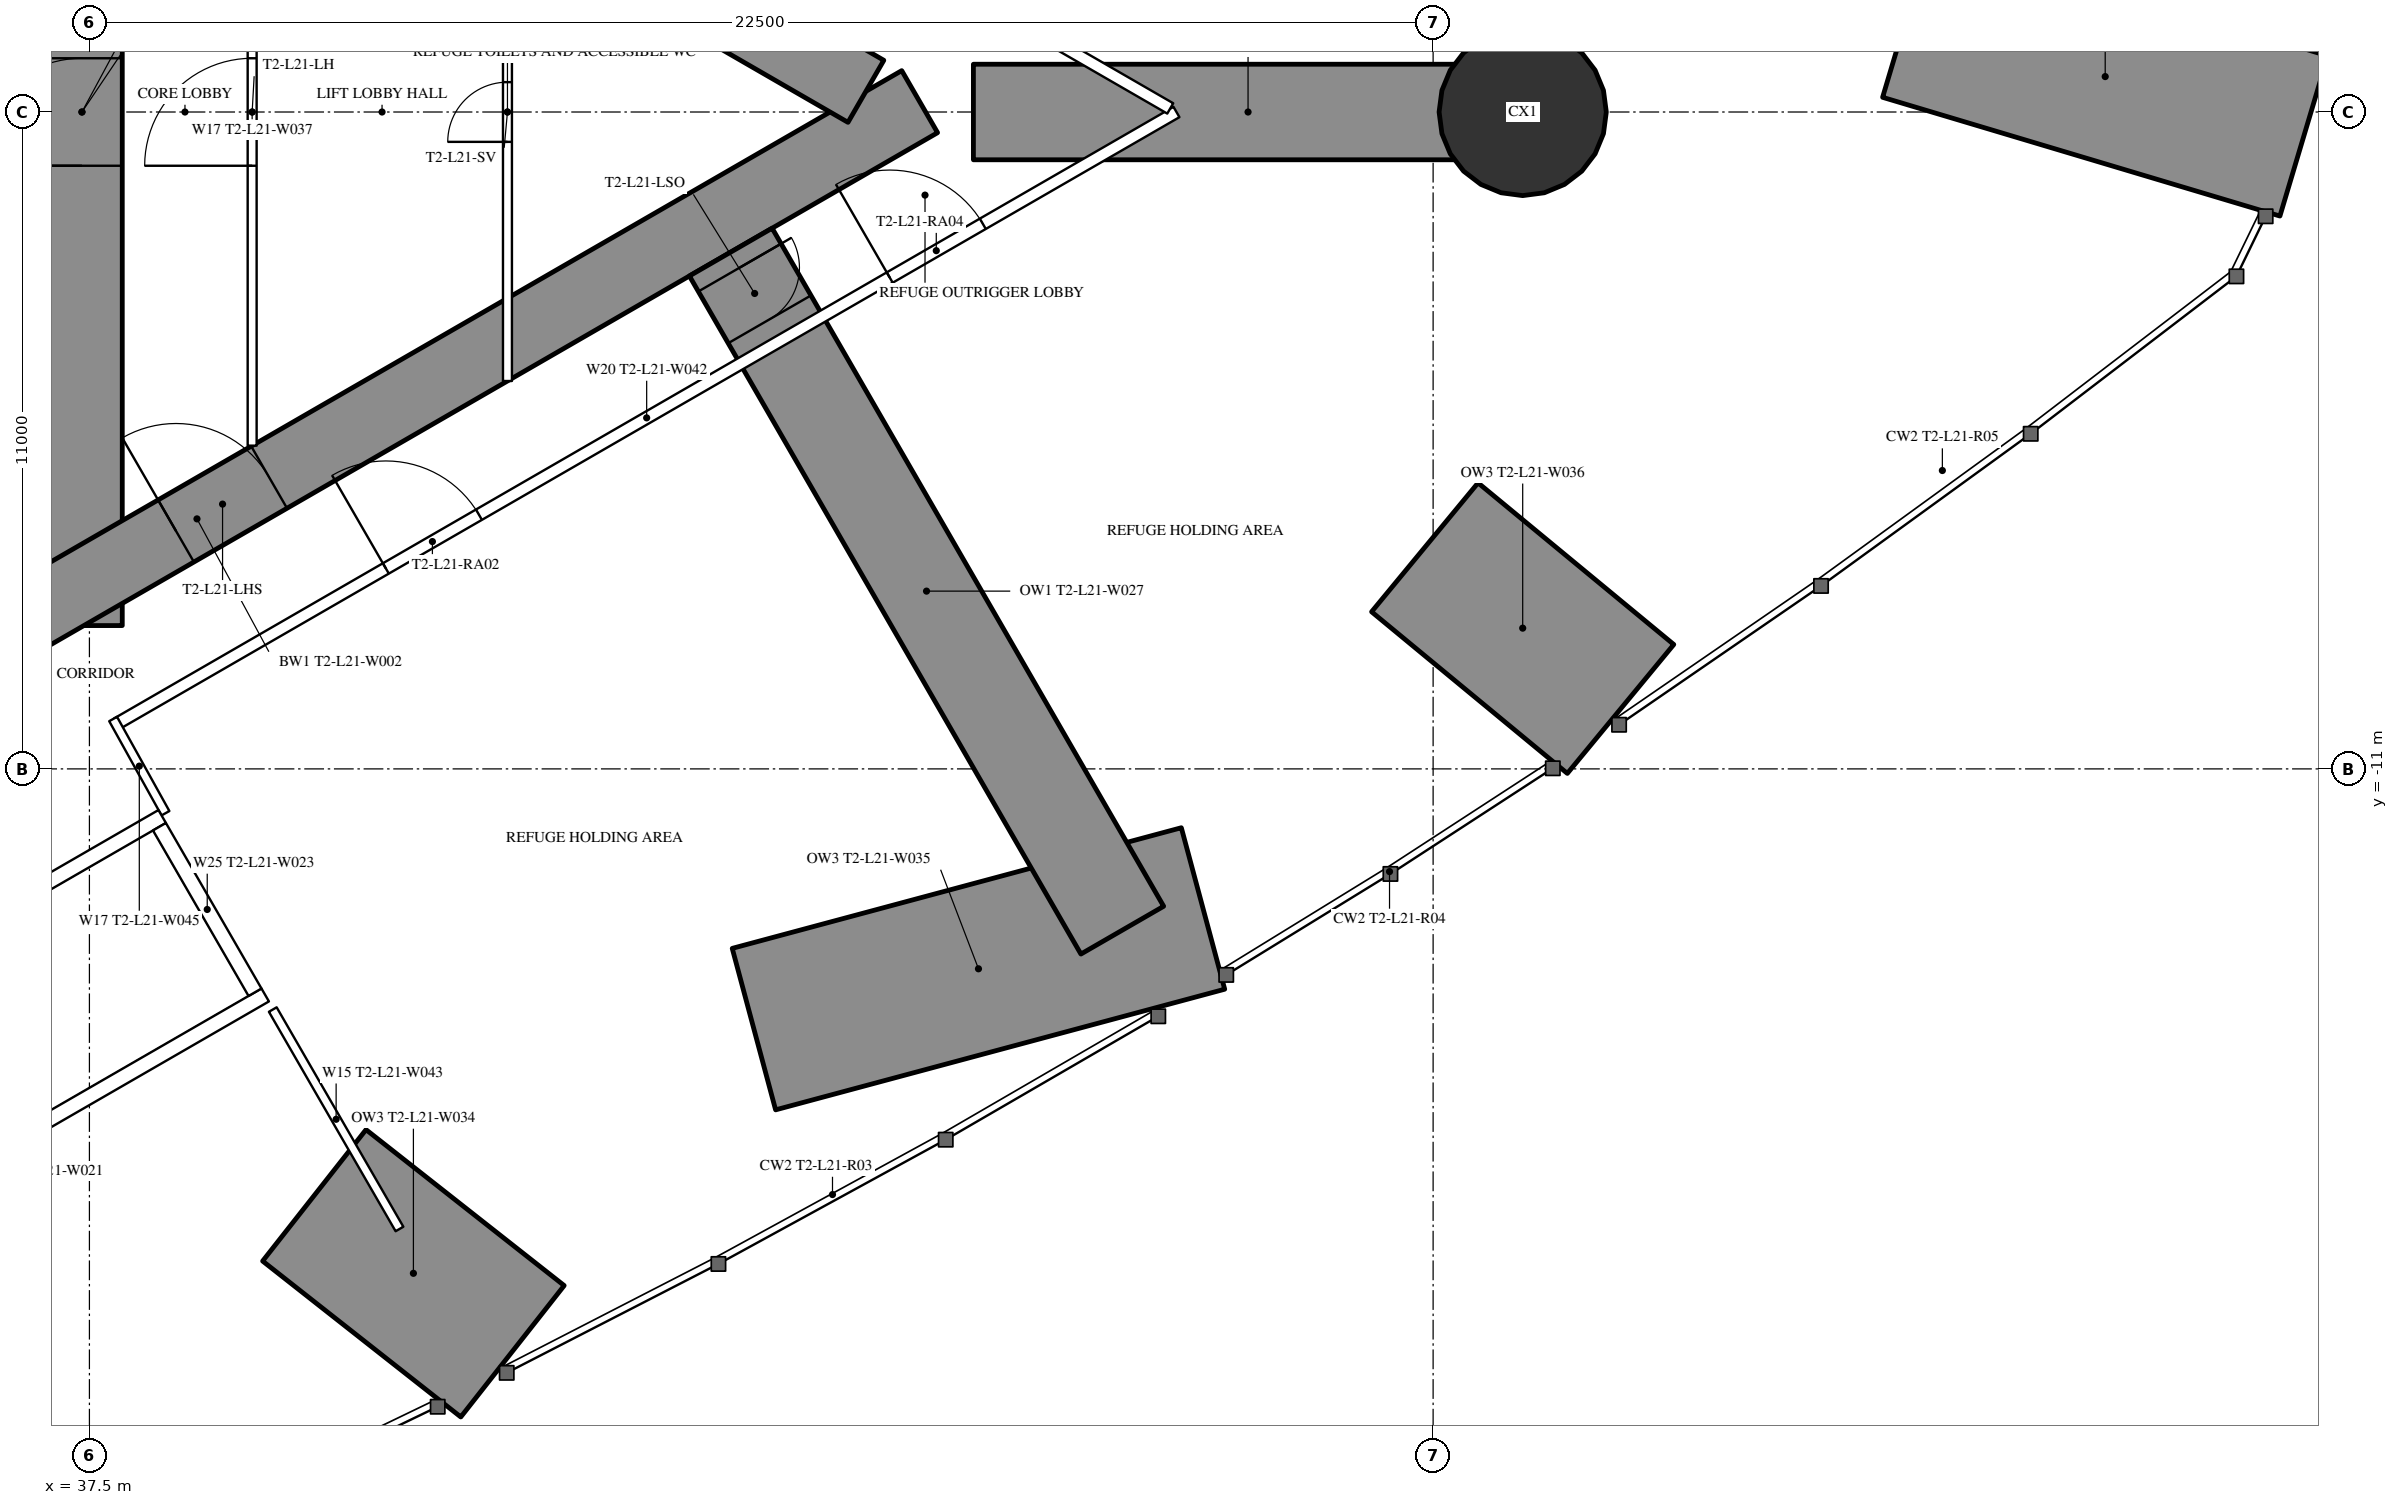
"""IFC4 building model, lengths in metres.
Left out: names, types, materials, properties, quantities, classifications, styles, units other than length and angle.
Written with IfcOpenShell. Run it as: python <this file> out.ifc"""

import sys

from ifc_helpers import new_model, si_unit, direction, frame, frame_2d, origin, origin_2d, place, context, subcontext, project, spatial, rectangle, hollow_circle, extrude, element, fill, save


model = new_model("IFC4")
c1 = context("Model", 3, precision=1e-05, world=origin(), true_north=direction((0.0, 1.0)))
c2 = subcontext(c1, "Body", "Model", "MODEL_VIEW")
j1 = project(units=[si_unit("LENGTHUNIT", "METRE"), si_unit("PLANEANGLEUNIT", "RADIAN")], contexts=[c1])
p1 = place(None, origin())
s1 = spatial("IfcSite", under=j1, at=p1, CompositionType="ELEMENT")
p2 = place(p1, origin())
s2 = spatial("IfcBuilding", under=s1, at=p2, CompositionType="ELEMENT")
p3 = place(p2, frame((0.0, 0.0, 81.0)))
s3 = spatial("IfcBuildingStorey", under=s2, at=p3, CompositionType="ELEMENT", Elevation=81.0)
p4 = place(p3, frame((74.581, -0.401, 0.0), z_axis=(0.0, 0.0, 1.0), x_axis=(-0.958128639998, 0.286338102974, 0.0)))
e1 = element("IfcWall", 1, at=p4, inside=s3, PredefinedType="SHEAR", context=c2, shape_type="SweptSolid", body=[
    extrude(rectangle(XDim=6.944, YDim=2.8, at=frame_2d((3.472, 0.0))), origin(), (0.0, 0.0, 1.0), 6.0),
])
p5 = place(p3, frame((44.584, -20.752, 0.0), z_axis=(0.0, 0.0, 1.0), x_axis=(-0.785936955348, 0.618306640931, 0.0)))
e2 = element("IfcWall", 2, at=p5, inside=s3, PredefinedType="SHEAR", context=c2, shape_type="SweptSolid", body=[
    extrude(rectangle(XDim=4.222, YDim=2.8, at=frame_2d((2.111, 0.0))), origin(), (0.0, 0.0, 1.0), 6.0),
])
p6 = place(p3, frame((56.147, -13.337, 0.0), z_axis=(0.0, 0.0, 1.0), x_axis=(-0.965766047912, -0.259414611578, 0.0)))
e3 = element("IfcWall", 3, at=p6, inside=s3, PredefinedType="SHEAR", context=c2, shape_type="SweptSolid", body=[
    extrude(rectangle(XDim=7.787, YDim=2.8, at=frame_2d((3.894, 0.0))), origin(), (0.0, 0.0, 1.0), 6.0),
])
p7 = place(p3, frame((63.139, -9.996, 0.0), z_axis=(0.0, 0.0, 1.0), x_axis=(-0.771080676244, 0.636737458238, 0.0)))
e4 = element("IfcWall", 4, at=p7, inside=s3, PredefinedType="SHEAR", context=c2, shape_type="SweptSolid", body=[
    extrude(rectangle(XDim=4.251, YDim=2.8, at=frame_2d((2.125, 0.0))), origin(), (0.0, 0.0, 1.0), 6.0),
])
p8 = place(p3, frame((61.5, 0.0, 0.0), z_axis=(0.0, 0.0, 1.0), x_axis=(1.0, 0.0, 0.0)))
e5 = element("IfcColumn", 5, at=p8, inside=s3, PredefinedType="COLUMN", context=c2, shape_type="SweptSolid", body=[
    extrude(hollow_circle(Radius=1.4, WallThickness=0.1, at=origin_2d()), origin(), (0.0, 0.0, 1.0), 6.0),
])
p9 = place(p3, frame((37.375, -8.6, 0.0), z_axis=(0.0, 0.0, 1.0), x_axis=(0.0, 1.0, 0.0)))
e6 = element("IfcWall", 6, at=p9, inside=s3, PredefinedType="SHEAR", context=c2, shape_type="SweptSolid", body=[
    extrude(rectangle(XDim=17.2, YDim=1.35, at=frame_2d((8.6, 0.0))), origin(), (0.0, 0.0, 1.0), 6.0),
])
p10 = place(p9, frame((7.7, 0.0, 0.0)))
e7 = element("IfcOpeningElement", 7, at=p10, cuts=e6, PredefinedType="OPENING", context=c2, shape_type="SweptSolid", body=[
    extrude(rectangle(XDim=1.8, YDim=2.2, at=frame_2d((0.9, 1.1))), frame((0.0, 0.685, 0.0), z_axis=(0.0, -1.0, 0.0), x_axis=(1.0, 0.0, 0.0)), (0.0, 0.0, 1.0), 1.37),
])
p11 = place(p3, frame((27.2, -13.8, 0.0), z_axis=(0.0, 0.0, 1.0), x_axis=(0.866027159892, 0.499996958321, 0.0)))
e8 = element("IfcWall", 8, at=p11, inside=s3, PredefinedType="SHEAR", context=c2, shape_type="SweptSolid", body=[
    extrude(rectangle(XDim=27.947, YDim=1.2, at=frame_2d((13.973, 0.0))), origin(), (0.0, 0.0, 1.0), 6.0),
])
p12 = place(p11, frame((4.6, 0.0, 0.0)))
e9 = element("IfcOpeningElement", 9, at=p12, cuts=e8, PredefinedType="OPENING", context=c2, shape_type="SweptSolid", body=[
    extrude(rectangle(XDim=1.0, YDim=2.2, at=frame_2d((0.5, 1.1))), frame((0.0, 0.61, 0.0), z_axis=(0.0, -1.0, 0.0), x_axis=(1.0, 0.0, 0.0)), (0.0, 0.0, 1.0), 1.22),
])
p13 = place(p11, frame((13.568, 0.0, 0.0)))
e10 = element("IfcOpeningElement", 10, at=p13, cuts=e8, PredefinedType="OPENING", context=c2, shape_type="SweptSolid", body=[
    extrude(rectangle(XDim=1.8, YDim=2.2, at=frame_2d((0.9, 1.1))), frame((0.0, 0.61, 0.0), z_axis=(0.0, -1.0, 0.0), x_axis=(1.0, 0.0, 0.0)), (0.0, 0.0, 1.0), 1.22),
])
p14 = place(p3, frame((27.2, 13.8, 0.0), z_axis=(0.0, 0.0, 1.0), x_axis=(0.866024515034, -0.500001539357, 0.0)))
e11 = element("IfcWall", 11, at=p14, inside=s3, PredefinedType="SHEAR", context=c2, shape_type="SweptSolid", body=[
    extrude(rectangle(XDim=26.907, YDim=1.2, at=frame_2d((13.454, 0.0))), origin(), (0.0, 0.0, 1.0), 6.0),
])
p15 = place(p14, frame((4.6, 0.0, 0.0)))
e12 = element("IfcOpeningElement", 12, at=p15, cuts=e11, PredefinedType="OPENING", context=c2, shape_type="SweptSolid", body=[
    extrude(rectangle(XDim=1.0, YDim=2.2, at=frame_2d((0.5, 1.1))), frame((0.0, 0.61, 0.0), z_axis=(0.0, -1.0, 0.0), x_axis=(1.0, 0.0, 0.0)), (0.0, 0.0, 1.0), 1.22),
])
p16 = place(p14, frame((13.568, 0.0, 0.0)))
e13 = element("IfcOpeningElement", 13, at=p16, cuts=e11, PredefinedType="OPENING", context=c2, shape_type="SweptSolid", body=[
    extrude(rectangle(XDim=1.8, YDim=2.2, at=frame_2d((0.9, 1.1))), frame((0.0, 0.61, 0.0), z_axis=(0.0, -1.0, 0.0), x_axis=(1.0, 0.0, 0.0)), (0.0, 0.0, 1.0), 1.22),
])
p17 = place(p3, frame((48.239, -2.346, 0.0), z_axis=(0.0, 0.0, 1.0), x_axis=(0.500006130383, -0.866021864377, 0.0)))
e14 = element("IfcWall", 14, at=p17, inside=s3, PredefinedType="SHEAR", context=c2, shape_type="SweptSolid", body=[
    extrude(rectangle(XDim=13.112, YDim=1.6, at=frame_2d((6.556, 0.0))), origin(), (0.0, 0.0, 1.0), 6.0),
])
p18 = place(p17, frame((0.3, 0.0, 0.0)))
e15 = element("IfcOpeningElement", 15, at=p18, cuts=e14, PredefinedType="OPENING", context=c2, shape_type="SweptSolid", body=[
    extrude(rectangle(XDim=1.0, YDim=2.2, at=frame_2d((0.5, 1.1))), frame((0.0, 0.81, 0.0), z_axis=(0.0, -1.0, 0.0), x_axis=(1.0, 0.0, 0.0)), (0.0, 0.0, 1.0), 1.62),
])
p19 = place(p3, frame((52.302, 0.0, 0.0), z_axis=(0.0, 0.0, 1.0), x_axis=(1.0, 0.0, 0.0)))
e16 = element("IfcWall", 16, at=p19, inside=s3, PredefinedType="SHEAR", context=c2, shape_type="SweptSolid", body=[
    extrude(rectangle(XDim=9.198, YDim=1.6, at=frame_2d((4.599, 0.0))), origin(), (0.0, 0.0, 1.0), 6.0),
])
p20 = place(p3, frame((40.57, -15.03, 0.0), z_axis=(0.0, 0.0, 1.0), x_axis=(0.500012993597, -0.866017901798, 0.0)))
e17 = element("IfcWall", 17, at=p20, inside=s3, PredefinedType="PARTITIONING", context=c2, shape_type="SweptSolid", body=[
    extrude(rectangle(XDim=4.243, YDim=0.15, at=frame_2d((2.122, 0.0))), origin(), (0.0, 0.0, 1.0), 5.75),
])
p21 = place(p3, frame((37.96, -10.243, 0.0), z_axis=(0.0, 0.0, 1.0), x_axis=(0.866026429433, 0.499998223521, 0.0)))
e18 = element("IfcWall", 18, at=p21, inside=s3, PredefinedType="PARTITIONING", context=c2, shape_type="SweptSolid", body=[
    extrude(rectangle(XDim=20.487, YDim=0.2, at=frame_2d((10.243, 0.0))), origin(), (0.0, 0.0, 1.0), 5.75),
])
p22 = place(p21, frame((14.943, 0.0, 0.0)))
e19 = element("IfcOpeningElement", 19, at=p22, cuts=e18, PredefinedType="OPENING", context=c2, shape_type="SweptSolid", body=[
    extrude(rectangle(XDim=1.8, YDim=2.2, at=frame_2d((0.9, 1.1))), frame((0.0, 0.11, 0.0), z_axis=(0.0, -1.0, 0.0), x_axis=(1.0, 0.0, 0.0)), (0.0, 0.0, 1.0), 0.22),
])
p23 = place(p21, frame((5.2, 0.0, 0.0)))
e20 = element("IfcOpeningElement", 20, at=p23, cuts=e18, PredefinedType="OPENING", context=c2, shape_type="SweptSolid", body=[
    extrude(rectangle(XDim=1.8, YDim=2.2, at=frame_2d((0.9, 1.1))), frame((0.0, 0.11, 0.0), z_axis=(0.0, -1.0, 0.0), x_axis=(1.0, 0.0, 0.0)), (0.0, 0.0, 1.0), 0.22),
])
p24 = place(p3, frame((36.834, 10.894, 0.0), z_axis=(0.0, 0.0, 1.0), x_axis=(0.866028157229, -0.499995230863, 0.0)))
e21 = element("IfcWall", 21, at=p24, inside=s3, PredefinedType="PARTITIONING", context=c2, shape_type="SweptSolid", body=[
    extrude(rectangle(XDim=21.667, YDim=0.2, at=frame_2d((10.833, 0.0))), origin(), (0.0, 0.0, 1.0), 5.75),
])
p25 = place(p24, frame((14.594, 0.0, 0.0)))
e22 = element("IfcOpeningElement", 22, at=p25, cuts=e21, PredefinedType="OPENING", context=c2, shape_type="SweptSolid", body=[
    extrude(rectangle(XDim=1.8, YDim=2.2, at=frame_2d((0.9, 1.1))), frame((0.0, 0.11, 0.0), z_axis=(0.0, -1.0, 0.0), x_axis=(1.0, 0.0, 0.0)), (0.0, 0.0, 1.0), 0.22),
])
p26 = place(p24, frame((4.073, 0.0, 0.0)))
e23 = element("IfcOpeningElement", 23, at=p26, cuts=e21, PredefinedType="OPENING", context=c2, shape_type="SweptSolid", body=[
    extrude(rectangle(XDim=2.0, YDim=2.4, at=frame_2d((1.0, 1.2))), frame((0.0, 0.11, 0.0), z_axis=(0.0, -1.0, 0.0), x_axis=(1.0, 0.0, 0.0)), (0.0, 0.0, 1.0), 0.22),
])
p27 = place(p3, frame((38.773, -11.742, 0.0), z_axis=(0.0, 0.0, 1.0), x_axis=(-0.485528096672, 0.8742210632, 0.0)))
e24 = element("IfcWall", 24, at=p27, inside=s3, PredefinedType="PARTITIONING", context=c2, shape_type="SweptSolid", body=[
    extrude(rectangle(XDim=1.805, YDim=0.15, at=frame_2d((0.903, 0.0))), origin(), (0.0, 0.0, 1.0), 5.75),
])
p28 = place(p3, frame((40.225, -5.587, 0.0), z_axis=(0.0, 0.0, 1.0), x_axis=(0.0, 1.0, 0.0)))
e25 = element("IfcWall", 25, at=p28, inside=s3, PredefinedType="PARTITIONING", context=c2, shape_type="SweptSolid", body=[
    extrude(rectangle(XDim=11.174, YDim=0.15, at=frame_2d((5.587, 0.0))), origin(), (0.0, 0.0, 1.0), 5.75),
])
p29 = place(p28, frame((4.687, 0.0, 0.0)))
e26 = element("IfcOpeningElement", 26, at=p29, cuts=e25, PredefinedType="OPENING", context=c2, shape_type="SweptSolid", body=[
    extrude(rectangle(XDim=1.8, YDim=2.2, at=frame_2d((0.9, 1.1))), frame((0.0, 0.085, 0.0), z_axis=(0.0, -1.0, 0.0), x_axis=(1.0, 0.0, 0.0)), (0.0, 0.0, 1.0), 0.17),
])
p30 = place(p3, frame((44.5, -4.505, 0.0), z_axis=(0.0, 0.0, 1.0), x_axis=(0.0, 1.0, 0.0)))
e27 = element("IfcWall", 27, at=p30, inside=s3, PredefinedType="PARTITIONING", context=c2, shape_type="SweptSolid", body=[
    extrude(rectangle(XDim=9.009, YDim=0.15, at=frame_2d((4.505, 0.0))), origin(), (0.0, 0.0, 1.0), 5.75),
])
p31 = place(p30, frame((4.005, 0.0, 0.0)))
e28 = element("IfcOpeningElement", 28, at=p31, cuts=e27, PredefinedType="OPENING", context=c2, shape_type="SweptSolid", body=[
    extrude(rectangle(XDim=1.0, YDim=2.2, at=frame_2d((0.5, 1.1))), frame((0.0, 0.085, 0.0), z_axis=(0.0, -1.0, 0.0), x_axis=(1.0, 0.0, 0.0)), (0.0, 0.0, 1.0), 0.17),
])
for number, where, z_axis, x_axis in (
    (29, (31.271, -16.097, 0.0), (0.0, 0.0, 1.0), (0.866, 0.5, 0.0)),
    (30, (32.996, -19.086, 0.0), (0.0, 0.0, 1.0), (0.866, 0.5, 0.0)),
):
    element("IfcWall", number, at=place(p3, frame(where, z_axis=z_axis, x_axis=x_axis)), inside=s3, PredefinedType="PARTITIONING", context=c2, shape_type="SweptSolid", body=[
        extrude(rectangle(XDim=8.6, YDim=0.25, at=frame_2d((4.3, 0.0))), origin(), (0.0, 0.0, 1.0), 5.75),
    ])
p32 = place(p3, frame((38.673, -11.968, 0.0), z_axis=(0.0, 0.0, 1.0), x_axis=(0.499929347863, -0.866066190972, 0.0)))
e31 = element("IfcWall", 31, at=p32, inside=s3, PredefinedType="PARTITIONING", context=c2, shape_type="SweptSolid", body=[
    extrude(rectangle(XDim=3.201, YDim=0.25, at=frame_2d((1.6, 0.0))), origin(), (0.0, 0.0, 1.0), 5.75),
])
p33 = place(p18, origin())
e32 = element("IfcDoor", 32, at=p33, inside=s3, OperationType="SINGLE_SWING_LEFT", PredefinedType="DOOR", context=c2, shape_type="SweptSolid", body=[
    extrude(rectangle(XDim=1.0, YDim=2.2, at=frame_2d((0.5, 1.1))), frame((0.0, 0.025, 0.0), z_axis=(0.0, -1.0, 0.0), x_axis=(1.0, 0.0, 0.0)), (0.0, 0.0, 1.0), 0.05),
])
fill(e15, e32)
p34 = place(p22, origin())
e33 = element("IfcDoor", 33, at=p34, inside=s3, OperationType="DOUBLE_DOOR_SINGLE_SWING", PredefinedType="DOOR", context=c2, shape_type="SweptSolid", body=[
    extrude(rectangle(XDim=1.8, YDim=2.2, at=frame_2d((0.9, 1.1))), frame((0.0, 0.025, 0.0), z_axis=(0.0, -1.0, 0.0), x_axis=(1.0, 0.0, 0.0)), (0.0, 0.0, 1.0), 0.05),
])
fill(e19, e33)
p35 = place(p23, origin())
e34 = element("IfcDoor", 34, at=p35, inside=s3, OperationType="DOUBLE_DOOR_SINGLE_SWING", PredefinedType="DOOR", context=c2, shape_type="SweptSolid", body=[
    extrude(rectangle(XDim=1.8, YDim=2.2, at=frame_2d((0.9, 1.1))), frame((0.0, 0.025, 0.0), z_axis=(0.0, -1.0, 0.0), x_axis=(1.0, 0.0, 0.0)), (0.0, 0.0, 1.0), 0.05),
])
fill(e20, e34)
p36 = place(p29, origin())
e35 = element("IfcDoor", 35, at=p36, inside=s3, OperationType="DOUBLE_DOOR_SINGLE_SWING", PredefinedType="DOOR", context=c2, shape_type="SweptSolid", body=[
    extrude(rectangle(XDim=1.8, YDim=2.2, at=frame_2d((0.9, 1.1))), frame((0.0, 0.025, 0.0), z_axis=(0.0, -1.0, 0.0), x_axis=(1.0, 0.0, 0.0)), (0.0, 0.0, 1.0), 0.05),
])
fill(e26, e35)
p37 = place(p31, origin())
e36 = element("IfcDoor", 36, at=p37, inside=s3, OperationType="SINGLE_SWING_LEFT", PredefinedType="DOOR", context=c2, shape_type="SweptSolid", body=[
    extrude(rectangle(XDim=1.0, YDim=2.2, at=frame_2d((0.5, 1.1))), frame((0.0, 0.025, 0.0), z_axis=(0.0, -1.0, 0.0), x_axis=(1.0, 0.0, 0.0)), (0.0, 0.0, 1.0), 0.05),
])
fill(e28, e36)
p38 = place(p13, origin())
e37 = element("IfcDoor", 37, at=p38, inside=s3, OperationType="DOUBLE_DOOR_SINGLE_SWING", PredefinedType="DOOR", context=c2, shape_type="SweptSolid", body=[
    extrude(rectangle(XDim=1.8, YDim=2.2, at=frame_2d((0.9, 1.1))), frame((0.0, 0.025, 0.0), z_axis=(0.0, -1.0, 0.0), x_axis=(1.0, 0.0, 0.0)), (0.0, 0.0, 1.0), 0.05),
])
fill(e10, e37)
p39 = place(p10, origin())
e38 = element("IfcDoor", 38, at=p39, inside=s3, OperationType="DOUBLE_DOOR_SINGLE_SWING", PredefinedType="DOOR", context=c2, shape_type="SweptSolid", body=[
    extrude(rectangle(XDim=1.8, YDim=2.2, at=frame_2d((0.9, 1.1))), frame((0.0, 0.025, 0.0), z_axis=(0.0, -1.0, 0.0), x_axis=(1.0, 0.0, 0.0)), (0.0, 0.0, 1.0), 0.05),
])
fill(e7, e38)
save(model, sys.argv[1])
